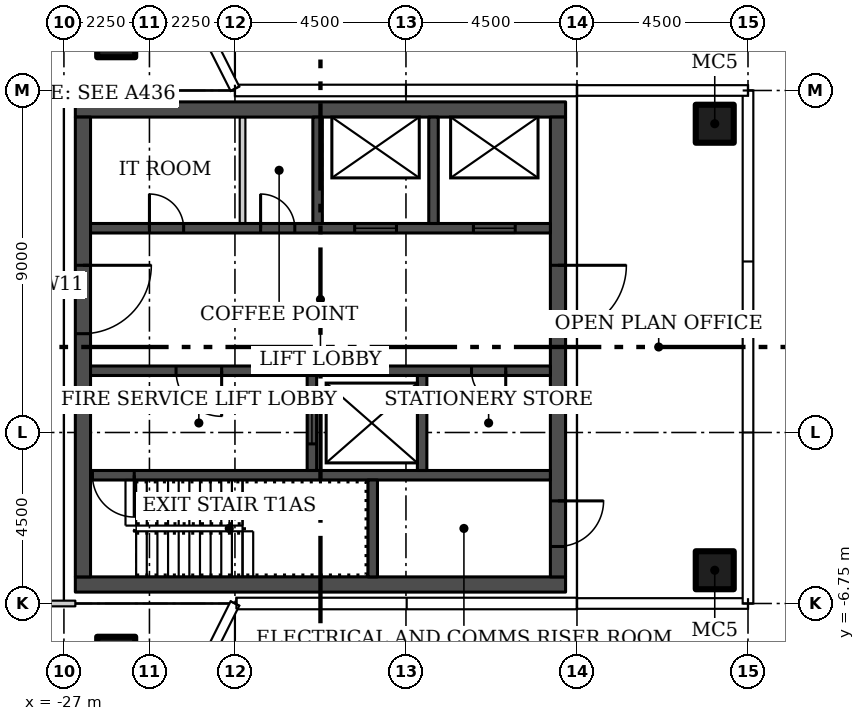
"""IFC4 building model, lengths in metres.
Left out: names, types, materials, properties, quantities, classifications, styles, units other than length and angle.
Written with IfcOpenShell. Run it as: python <this file> out.ifc"""

import sys

from ifc_helpers import new_model, si_unit, direction, frame, frame_2d, origin, origin_2d, place, context, subcontext, project, spatial, rectangle, hollow_rectangle, extrude, element, fill, save


model = new_model("IFC4")
c1 = context("Model", 3, precision=1e-05, world=origin(), true_north=direction((0.0, 1.0)))
c2 = subcontext(c1, "Body", "Model", "MODEL_VIEW")
j1 = project(units=[si_unit("LENGTHUNIT", "METRE"), si_unit("PLANEANGLEUNIT", "RADIAN")], contexts=[c1])
p1 = place(None, origin())
s1 = spatial("IfcSite", under=j1, at=p1, CompositionType="ELEMENT")
p2 = place(p1, origin())
s2 = spatial("IfcBuilding", under=s1, at=p2, CompositionType="ELEMENT")
p3 = place(p2, frame((0.0, 0.0, 217.8)))
s3 = spatial("IfcBuildingStorey", under=s2, at=p3, CompositionType="ELEMENT", Elevation=217.8)
for number, where in (
    (1, (-25.625, 8.125, 0.0)),
    (2, (-25.625, -8.125, 0.0)),
    (3, (-9.875, -5.875, 0.0)),
    (4, (-9.875, 5.875, 0.0)),
):
    element("IfcColumn", number, at=place(p3, frame(where)), inside=s3, PredefinedType="COLUMN", context=c2, shape_type="SweptSolid", body=[
        extrude(hollow_rectangle(XDim=1.0, YDim=1.0, WallThickness=0.04, at=origin_2d()), origin(), (0.0, 0.0, 1.0), 3.55),
    ])
p4 = place(p3, frame((-40.8, 6.75, 0.0)))
e5 = element("IfcWall", 5, at=p4, inside=s3, PredefinedType="PARTITIONING", context=c2, shape_type="SweptSolid", body=[
    extrude(rectangle(XDim=14.1, YDim=0.15, at=frame_2d((7.05, 0.0))), origin(), (0.0, 0.0, 1.0), 3.55),
])
p5 = place(p4, frame((6.3, 0.0, 0.0)))
e6 = element("IfcOpeningElement", 6, at=p5, cuts=e5, PredefinedType="OPENING", context=c2, shape_type="SweptSolid", body=[
    extrude(rectangle(XDim=1.5, YDim=2.1, at=frame_2d((0.75, 1.05))), frame((0.0, 0.085, 0.0), z_axis=(0.0, -1.0, 0.0), x_axis=(1.0, 0.0, 0.0)), (0.0, 0.0, 1.0), 0.17),
])
p6 = place(p3, frame((-26.7, -6.75, 0.0), z_axis=(0.0, 0.0, 1.0), x_axis=(-1.0, 0.0, 0.0)))
e7 = element("IfcWall", 7, at=p6, inside=s3, PredefinedType="PARTITIONING", context=c2, shape_type="SweptSolid", body=[
    extrude(rectangle(XDim=14.1, YDim=0.15, at=frame_2d((7.05, 0.0))), origin(), (0.0, 0.0, 1.0), 3.55),
])
p7 = place(p6, frame((6.3, 0.0, 0.0)))
e8 = element("IfcOpeningElement", 8, at=p7, cuts=e7, PredefinedType="OPENING", context=c2, shape_type="SweptSolid", body=[
    extrude(rectangle(XDim=1.5, YDim=2.1, at=frame_2d((0.75, 1.05))), frame((0.0, 0.085, 0.0), z_axis=(0.0, -1.0, 0.0), x_axis=(1.0, 0.0, 0.0)), (0.0, 0.0, 1.0), 0.17),
])
for number, where in (
    (9, (-26.7, -6.25, 0.0)),
    (10, (-26.7, 6.25, 0.0)),
):
    element("IfcWall", number, at=place(p3, frame(where)), inside=s3, PredefinedType="SHEAR", context=c2, shape_type="SweptSolid", body=[
        extrude(rectangle(XDim=12.9, YDim=0.4, at=frame_2d((6.45, 0.0))), origin(), (0.0, 0.0, 1.0), 3.55),
    ])
p8 = place(p3, frame((-26.5, 6.05, 0.0), z_axis=(0.0, 0.0, 1.0), x_axis=(0.0, -1.0, 0.0)))
e11 = element("IfcWall", 11, at=p8, inside=s3, PredefinedType="SHEAR", context=c2, shape_type="SweptSolid", body=[
    extrude(rectangle(XDim=12.1, YDim=0.4, at=frame_2d((6.05, 0.0))), origin(), (0.0, 0.0, 1.0), 3.55),
])
p9 = place(p8, frame((3.9, 0.0, 0.0)))
e12 = element("IfcOpeningElement", 12, at=p9, cuts=e11, PredefinedType="OPENING", context=c2, shape_type="SweptSolid", body=[
    extrude(rectangle(XDim=1.8, YDim=2.4, at=frame_2d((0.9, 1.2))), frame((0.0, 0.21, 0.0), z_axis=(0.0, -1.0, 0.0), x_axis=(1.0, 0.0, 0.0)), (0.0, 0.0, 1.0), 0.42),
])
p10 = place(p3, frame((-14.0, 6.05, 0.0), z_axis=(0.0, 0.0, 1.0), x_axis=(0.0, -1.0, 0.0)))
e13 = element("IfcWall", 13, at=p10, inside=s3, PredefinedType="SHEAR", context=c2, shape_type="SweptSolid", body=[
    extrude(rectangle(XDim=12.1, YDim=0.4, at=frame_2d((6.05, 0.0))), origin(), (0.0, 0.0, 1.0), 3.55),
])
p11 = place(p10, frame((10.1, 0.0, 0.0)))
e14 = element("IfcOpeningElement", 14, at=p11, cuts=e13, PredefinedType="OPENING", context=c2, shape_type="SweptSolid", body=[
    extrude(rectangle(XDim=1.2, YDim=2.1, at=frame_2d((0.6, 1.05))), frame((0.0, 0.21, 0.0), z_axis=(0.0, -1.0, 0.0), x_axis=(1.0, 0.0, 0.0)), (0.0, 0.0, 1.0), 0.42),
])
p12 = place(p10, frame((3.9, 0.0, 0.0)))
e15 = element("IfcOpeningElement", 15, at=p12, cuts=e13, PredefinedType="OPENING", context=c2, shape_type="SweptSolid", body=[
    extrude(rectangle(XDim=1.8, YDim=2.4, at=frame_2d((0.9, 1.2))), frame((0.0, 0.21, 0.0), z_axis=(0.0, -1.0, 0.0), x_axis=(1.0, 0.0, 0.0)), (0.0, 0.0, 1.0), 0.42),
])
p13 = place(p3, frame((-14.2, -3.375, 0.0), z_axis=(0.0, 0.0, 1.0), x_axis=(-1.0, 0.0, 0.0)))
e16 = element("IfcWall", 16, at=p13, inside=s3, PredefinedType="SHEAR", context=c2, shape_type="SweptSolid", body=[
    extrude(rectangle(XDim=12.1, YDim=0.25, at=frame_2d((6.05, 0.0))), origin(), (0.0, 0.0, 1.0), 3.55),
])
p14 = place(p13, frame((10.95, 0.0, 0.0)))
e17 = element("IfcOpeningElement", 17, at=p14, cuts=e16, PredefinedType="OPENING", context=c2, shape_type="SweptSolid", body=[
    extrude(rectangle(XDim=1.1, YDim=2.1, at=frame_2d((0.55, 1.05))), frame((0.0, 0.135, 0.0), z_axis=(0.0, -1.0, 0.0), x_axis=(1.0, 0.0, 0.0)), (0.0, 0.0, 1.0), 0.27),
])
p15 = place(p3, frame((-18.875, -6.05, 0.0), z_axis=(0.0, 0.0, 1.0), x_axis=(0.0, 1.0, 0.0)))
e18 = element("IfcWall", 18, at=p15, inside=s3, PredefinedType="SHEAR", context=c2, shape_type="SweptSolid", body=[
    extrude(rectangle(XDim=2.55, YDim=0.25, at=frame_2d((1.275, 0.0))), origin(), (0.0, 0.0, 1.0), 3.55),
])
p16 = place(p3, frame((-14.2, -0.625, 0.0), z_axis=(0.0, 0.0, 1.0), x_axis=(-1.0, 0.0, 0.0)))
e19 = element("IfcWall", 19, at=p16, inside=s3, PredefinedType="SHEAR", context=c2, shape_type="SweptSolid", body=[
    extrude(rectangle(XDim=12.1, YDim=0.25, at=frame_2d((6.05, 0.0))), origin(), (0.0, 0.0, 1.0), 3.55),
])
p17 = place(p16, frame((8.65, 0.0, 0.0)))
e20 = element("IfcOpeningElement", 20, at=p17, cuts=e19, PredefinedType="OPENING", context=c2, shape_type="SweptSolid", body=[
    extrude(rectangle(XDim=1.2, YDim=2.1, at=frame_2d((0.6, 1.05))), frame((0.0, 0.135, 0.0), z_axis=(0.0, -1.0, 0.0), x_axis=(1.0, 0.0, 0.0)), (0.0, 0.0, 1.0), 0.27),
])
p18 = place(p16, frame((1.175, 0.0, 0.0)))
e21 = element("IfcOpeningElement", 21, at=p18, cuts=e19, PredefinedType="OPENING", context=c2, shape_type="SweptSolid", body=[
    extrude(rectangle(XDim=0.9, YDim=2.1, at=frame_2d((0.45, 1.05))), frame((0.0, 0.135, 0.0), z_axis=(0.0, -1.0, 0.0), x_axis=(1.0, 0.0, 0.0)), (0.0, 0.0, 1.0), 0.27),
])
p19 = place(p3, frame((-20.475, -3.25, 0.0), z_axis=(0.0, 0.0, 1.0), x_axis=(0.0, 1.0, 0.0)))
e22 = element("IfcWall", 22, at=p19, inside=s3, PredefinedType="SHEAR", context=c2, shape_type="SweptSolid", body=[
    extrude(rectangle(XDim=2.5, YDim=0.25, at=frame_2d((1.25, 0.0))), origin(), (0.0, 0.0, 1.0), 3.55),
])
p20 = place(p19, frame((0.7, 0.0, 0.0)))
e23 = element("IfcOpeningElement", 23, at=p20, cuts=e22, PredefinedType="OPENING", context=c2, shape_type="SweptSolid", body=[
    extrude(rectangle(XDim=1.1, YDim=2.1, at=frame_2d((0.55, 1.05))), frame((0.0, 0.135, 0.0), z_axis=(0.0, -1.0, 0.0), x_axis=(1.0, 0.0, 0.0)), (0.0, 0.0, 1.0), 0.27),
])
p21 = place(p3, frame((-17.575, -3.25, 0.0), z_axis=(0.0, 0.0, 1.0), x_axis=(0.0, 1.0, 0.0)))
e24 = element("IfcWall", 24, at=p21, inside=s3, PredefinedType="SHEAR", context=c2, shape_type="SweptSolid", body=[
    extrude(rectangle(XDim=2.5, YDim=0.25, at=frame_2d((1.25, 0.0))), origin(), (0.0, 0.0, 1.0), 3.55),
])
p22 = place(p3, frame((-26.3, 3.125, 0.0)))
e25 = element("IfcWall", 25, at=p22, inside=s3, PredefinedType="SHEAR", context=c2, shape_type="SweptSolid", body=[
    extrude(rectangle(XDim=12.1, YDim=0.25, at=frame_2d((6.05, 0.0))), origin(), (0.0, 0.0, 1.0), 3.55),
])
p23 = place(p22, frame((6.95, 0.0, 0.0)))
e26 = element("IfcOpeningElement", 26, at=p23, cuts=e25, PredefinedType="OPENING", context=c2, shape_type="SweptSolid", body=[
    extrude(rectangle(XDim=1.1, YDim=2.1, at=frame_2d((0.55, 1.05))), frame((0.0, 0.135, 0.0), z_axis=(0.0, -1.0, 0.0), x_axis=(1.0, 0.0, 0.0)), (0.0, 0.0, 1.0), 0.27),
])
p24 = place(p22, frame((10.075, 0.0, 0.0)))
e27 = element("IfcOpeningElement", 27, at=p24, cuts=e25, PredefinedType="OPENING", context=c2, shape_type="SweptSolid", body=[
    extrude(rectangle(XDim=1.1, YDim=2.1, at=frame_2d((0.55, 1.05))), frame((0.0, 0.135, 0.0), z_axis=(0.0, -1.0, 0.0), x_axis=(1.0, 0.0, 0.0)), (0.0, 0.0, 1.0), 0.27),
])
p25 = place(p22, frame((1.55, 0.0, 0.0)))
e28 = element("IfcOpeningElement", 28, at=p25, cuts=e25, PredefinedType="OPENING", context=c2, shape_type="SweptSolid", body=[
    extrude(rectangle(XDim=0.9, YDim=2.1, at=frame_2d((0.45, 1.05))), frame((0.0, 0.135, 0.0), z_axis=(0.0, -1.0, 0.0), x_axis=(1.0, 0.0, 0.0)), (0.0, 0.0, 1.0), 0.27),
])
p26 = place(p22, frame((4.475, 0.0, 0.0)))
e29 = element("IfcOpeningElement", 29, at=p26, cuts=e25, PredefinedType="OPENING", context=c2, shape_type="SweptSolid", body=[
    extrude(rectangle(XDim=0.9, YDim=2.1, at=frame_2d((0.45, 1.05))), frame((0.0, 0.135, 0.0), z_axis=(0.0, -1.0, 0.0), x_axis=(1.0, 0.0, 0.0)), (0.0, 0.0, 1.0), 0.27),
])
for number, where, z_axis, x_axis in (
    (30, (-20.325, 3.25, 0.0), (0.0, 0.0, 1.0), (0.0, 1.0, 0.0)),
    (31, (-17.275, 3.25, 0.0), (0.0, 0.0, 1.0), (0.0, 1.0, 0.0)),
):
    element("IfcWall", number, at=place(p3, frame(where, z_axis=z_axis, x_axis=x_axis)), inside=s3, PredefinedType="SHEAR", context=c2, shape_type="SweptSolid", body=[
        extrude(rectangle(XDim=2.8, YDim=0.25, at=frame_2d((1.4, 0.0))), origin(), (0.0, 0.0, 1.0), 3.55),
    ])
p27 = place(p3, frame((-22.3, 3.25, 0.0), z_axis=(0.0, 0.0, 1.0), x_axis=(0.0, 1.0, 0.0)))
e32 = element("IfcWall", 32, at=p27, inside=s3, PredefinedType="PARTITIONING", context=c2, shape_type="SweptSolid", body=[
    extrude(rectangle(XDim=2.8, YDim=0.15, at=frame_2d((1.4, 0.0))), origin(), (0.0, 0.0, 1.0), 3.55),
])
p28 = place(p9, origin())
e33 = element("IfcDoor", 33, at=p28, inside=s3, OperationType="DOUBLE_DOOR_SINGLE_SWING", PredefinedType="DOOR", context=c2, shape_type="SweptSolid", body=[
    extrude(rectangle(XDim=1.8, YDim=2.4, at=frame_2d((0.9, 1.2))), frame((0.0, 0.025, 0.0), z_axis=(0.0, -1.0, 0.0), x_axis=(1.0, 0.0, 0.0)), (0.0, 0.0, 1.0), 0.05),
])
fill(e12, e33)
p29 = place(p11, origin())
e34 = element("IfcDoor", 34, at=p29, inside=s3, OperationType="SINGLE_SWING_RIGHT", PredefinedType="DOOR", context=c2, shape_type="SweptSolid", body=[
    extrude(rectangle(XDim=1.2, YDim=2.1, at=frame_2d((0.6, 1.05))), frame((0.0, 0.025, 0.0), z_axis=(0.0, -1.0, 0.0), x_axis=(1.0, 0.0, 0.0)), (0.0, 0.0, 1.0), 0.05),
])
fill(e14, e34)
p30 = place(p12, origin())
e35 = element("IfcDoor", 35, at=p30, inside=s3, OperationType="DOUBLE_DOOR_SINGLE_SWING", PredefinedType="DOOR", context=c2, shape_type="SweptSolid", body=[
    extrude(rectangle(XDim=1.8, YDim=2.4, at=frame_2d((0.9, 1.2))), frame((0.0, 0.025, 0.0), z_axis=(0.0, -1.0, 0.0), x_axis=(1.0, 0.0, 0.0)), (0.0, 0.0, 1.0), 0.05),
])
fill(e15, e35)
p31 = place(p14, origin())
e36 = element("IfcDoor", 36, at=p31, inside=s3, OperationType="SINGLE_SWING_RIGHT", PredefinedType="DOOR", context=c2, shape_type="SweptSolid", body=[
    extrude(rectangle(XDim=1.1, YDim=2.1, at=frame_2d((0.55, 1.05))), frame((0.0, 0.025, 0.0), z_axis=(0.0, -1.0, 0.0), x_axis=(1.0, 0.0, 0.0)), (0.0, 0.0, 1.0), 0.05),
])
fill(e17, e36)
p32 = place(p17, origin())
e37 = element("IfcDoor", 37, at=p32, inside=s3, OperationType="SINGLE_SWING_RIGHT", PredefinedType="DOOR", context=c2, shape_type="SweptSolid", body=[
    extrude(rectangle(XDim=1.2, YDim=2.1, at=frame_2d((0.6, 1.05))), frame((0.0, 0.025, 0.0), z_axis=(0.0, -1.0, 0.0), x_axis=(1.0, 0.0, 0.0)), (0.0, 0.0, 1.0), 0.05),
])
fill(e20, e37)
p33 = place(p18, origin())
e38 = element("IfcDoor", 38, at=p33, inside=s3, OperationType="SINGLE_SWING_LEFT", PredefinedType="DOOR", context=c2, shape_type="SweptSolid", body=[
    extrude(rectangle(XDim=0.9, YDim=2.1, at=frame_2d((0.45, 1.05))), frame((0.0, 0.025, 0.0), z_axis=(0.0, -1.0, 0.0), x_axis=(1.0, 0.0, 0.0)), (0.0, 0.0, 1.0), 0.05),
])
fill(e21, e38)
p34 = place(p20, origin())
e39 = element("IfcDoor", 39, at=p34, inside=s3, OperationType="SLIDING_TO_LEFT", PredefinedType="DOOR", context=c2, shape_type="SweptSolid", body=[
    extrude(rectangle(XDim=1.1, YDim=2.1, at=frame_2d((0.55, 1.05))), frame((0.0, 0.025, 0.0), z_axis=(0.0, -1.0, 0.0), x_axis=(1.0, 0.0, 0.0)), (0.0, 0.0, 1.0), 0.05),
])
fill(e23, e39)
p35 = place(p23, origin())
e40 = element("IfcDoor", 40, at=p35, inside=s3, OperationType="SLIDING_TO_LEFT", PredefinedType="DOOR", context=c2, shape_type="SweptSolid", body=[
    extrude(rectangle(XDim=1.1, YDim=2.1, at=frame_2d((0.55, 1.05))), frame((0.0, 0.025, 0.0), z_axis=(0.0, -1.0, 0.0), x_axis=(1.0, 0.0, 0.0)), (0.0, 0.0, 1.0), 0.05),
])
fill(e26, e40)
p36 = place(p24, origin())
e41 = element("IfcDoor", 41, at=p36, inside=s3, OperationType="SLIDING_TO_LEFT", PredefinedType="DOOR", context=c2, shape_type="SweptSolid", body=[
    extrude(rectangle(XDim=1.1, YDim=2.1, at=frame_2d((0.55, 1.05))), frame((0.0, 0.025, 0.0), z_axis=(0.0, -1.0, 0.0), x_axis=(1.0, 0.0, 0.0)), (0.0, 0.0, 1.0), 0.05),
])
fill(e27, e41)
p37 = place(p25, origin())
e42 = element("IfcDoor", 42, at=p37, inside=s3, OperationType="SINGLE_SWING_LEFT", PredefinedType="DOOR", context=c2, shape_type="SweptSolid", body=[
    extrude(rectangle(XDim=0.9, YDim=2.1, at=frame_2d((0.45, 1.05))), frame((0.0, 0.025, 0.0), z_axis=(0.0, -1.0, 0.0), x_axis=(1.0, 0.0, 0.0)), (0.0, 0.0, 1.0), 0.05),
])
fill(e28, e42)
p38 = place(p26, origin())
e43 = element("IfcDoor", 43, at=p38, inside=s3, OperationType="SINGLE_SWING_LEFT", PredefinedType="DOOR", context=c2, shape_type="SweptSolid", body=[
    extrude(rectangle(XDim=0.9, YDim=2.1, at=frame_2d((0.45, 1.05))), frame((0.0, 0.025, 0.0), z_axis=(0.0, -1.0, 0.0), x_axis=(1.0, 0.0, 0.0)), (0.0, 0.0, 1.0), 0.05),
])
fill(e29, e43)
save(model, sys.argv[1])
